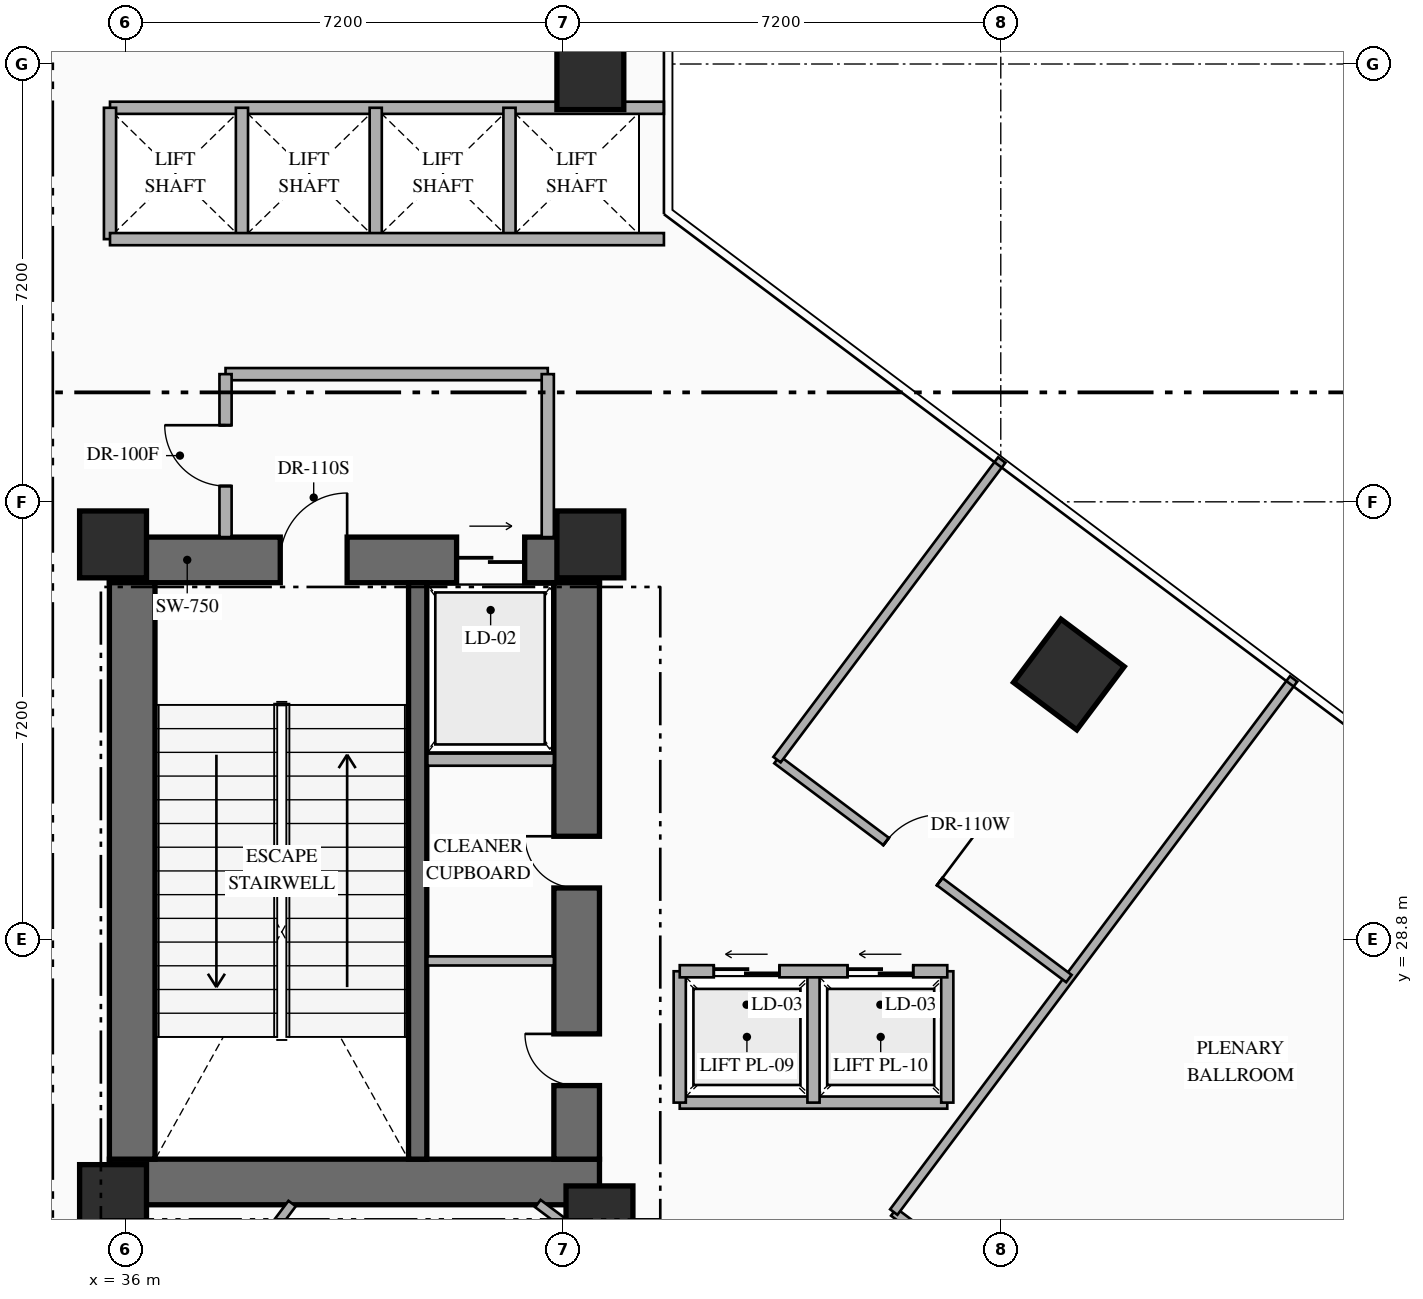
"""IFC4 building model, lengths in metres.
Left out: names, types, materials, properties, quantities, classifications, styles, units other than length and angle.
Written with IfcOpenShell. Run it as: python <this file> out.ifc"""

import sys

from ifc_helpers import new_model, si_unit, direction, frame, frame_2d, origin, origin_2d, place, context, subcontext, project, spatial, rectangle, extrude, element, fill, save


model = new_model("IFC4")
c1 = context("Model", 3, precision=1e-05, world=origin(), true_north=direction((0.0, 1.0)))
c2 = subcontext(c1, "Body", "Model", "MODEL_VIEW")
j1 = project(units=[si_unit("LENGTHUNIT", "METRE"), si_unit("PLANEANGLEUNIT", "RADIAN")], contexts=[c1])
p1 = place(None, origin())
s1 = spatial("IfcSite", under=j1, at=p1, CompositionType="ELEMENT")
p2 = place(p1, origin())
s2 = spatial("IfcBuilding", under=s1, at=p2, CompositionType="ELEMENT")
p3 = place(p2, frame((0.0, 0.0, 21.6)))
s3 = spatial("IfcBuildingStorey", under=s2, at=p3, CompositionType="ELEMENT", Elevation=21.6)
p4 = place(p3, frame((35.74, 24.815, 0.0), z_axis=(0.0, 0.0, 1.0), x_axis=(1.0, 0.0, 0.0)))
e1 = element("IfcWall", 1, at=p4, inside=s3, PredefinedType="SHEAR", context=c2, shape_type="SweptSolid", body=[
    extrude(rectangle(XDim=8.06, YDim=0.75, at=frame_2d((4.03, 0.0))), origin(), (0.0, 0.0, 1.0), 5.4),
])
p5 = place(p3, frame((35.74, 35.045, 0.0), z_axis=(0.0, 0.0, 1.0), x_axis=(1.0, 0.0, 0.0)))
e2 = element("IfcWall", 2, at=p5, inside=s3, PredefinedType="SHEAR", context=c2, shape_type="SweptSolid", body=[
    extrude(rectangle(XDim=8.06, YDim=0.75, at=frame_2d((4.03, 0.0))), origin(), (0.0, 0.0, 1.0), 5.4),
])
p6 = place(p5, frame((2.81, 0.0, 0.0)))
e3 = element("IfcOpeningElement", 3, at=p6, cuts=e2, PredefinedType="OPENING", context=c2, shape_type="SweptSolid", body=[
    extrude(rectangle(XDim=1.1, YDim=2.2, at=frame_2d((0.55, 1.1))), frame((0.0, 0.385, 0.0), z_axis=(0.0, -1.0, 0.0), x_axis=(1.0, 0.0, 0.0)), (0.0, 0.0, 1.0), 0.77),
])
p7 = place(p5, frame((5.71, 0.0, 0.0)))
e4 = element("IfcOpeningElement", 4, at=p7, cuts=e2, PredefinedType="OPENING", context=c2, shape_type="SweptSolid", body=[
    extrude(rectangle(XDim=1.12, YDim=2.15, at=frame_2d((0.56, 1.075))), frame((0.0, 0.385, 0.0), z_axis=(0.0, -1.0, 0.0), x_axis=(1.0, 0.0, 0.0)), (0.0, 0.0, 1.0), 0.77),
])
p8 = place(p3, frame((36.115, 25.19, 0.0), z_axis=(0.0, 0.0, 1.0), x_axis=(0.0, 1.0, 0.0)))
e5 = element("IfcWall", 5, at=p8, inside=s3, PredefinedType="SHEAR", context=c2, shape_type="SweptSolid", body=[
    extrude(rectangle(XDim=9.48, YDim=0.75, at=frame_2d((4.74, 0.0))), origin(), (0.0, 0.0, 1.0), 5.4),
])
p9 = place(p3, frame((43.425, 25.19, 0.0), z_axis=(0.0, 0.0, 1.0), x_axis=(0.0, 1.0, 0.0)))
e6 = element("IfcWall", 6, at=p9, inside=s3, PredefinedType="SHEAR", context=c2, shape_type="SweptSolid", body=[
    extrude(rectangle(XDim=9.48, YDim=0.75, at=frame_2d((4.74, 0.0))), origin(), (0.0, 0.0, 1.0), 5.4),
])
p10 = place(p9, frame((1.21, 0.0, 0.0)))
e7 = element("IfcOpeningElement", 7, at=p10, cuts=e6, PredefinedType="OPENING", context=c2, shape_type="SweptSolid", body=[
    extrude(rectangle(XDim=0.85, YDim=2.08, at=frame_2d((0.425, 1.04))), frame((0.0, 0.385, 0.0), z_axis=(0.0, -1.0, 0.0), x_axis=(1.0, 0.0, 0.0)), (0.0, 0.0, 1.0), 0.77),
])
p11 = place(p9, frame((4.46, 0.0, 0.0)))
e8 = element("IfcOpeningElement", 8, at=p11, cuts=e6, PredefinedType="OPENING", context=c2, shape_type="SweptSolid", body=[
    extrude(rectangle(XDim=0.85, YDim=2.08, at=frame_2d((0.425, 1.04))), frame((0.0, 0.385, 0.0), z_axis=(0.0, -1.0, 0.0), x_axis=(1.0, 0.0, 0.0)), (0.0, 0.0, 1.0), 0.77),
])
p12 = place(p3, frame((40.81, 25.19, 0.0), z_axis=(0.0, 0.0, 1.0), x_axis=(0.0, 1.0, 0.0)))
e9 = element("IfcWall", 9, at=p12, inside=s3, PredefinedType="SHEAR", context=c2, shape_type="SweptSolid", body=[
    extrude(rectangle(XDim=9.48, YDim=0.3, at=frame_2d((4.74, 0.0))), origin(), (0.0, 0.0, 1.0), 5.4),
])
for number, where, z_axis, x_axis in (
    (10, (35.8, 24.55, 0.0), (0.0, 0.0, 1.0), (1.0, 0.0, 0.0)),
    (11, (43.8, 24.2, 0.0), (0.0, 0.0, 1.0), (1.0, 0.0, 0.0)),
    (12, (35.8, 35.3, 0.0), (0.0, 0.0, 1.0), (1.0, 0.0, 0.0)),
    (13, (43.65, 35.3, 0.0), (0.0, 0.0, 1.0), (1.0, 0.0, 0.0)),
    (14, (43.65, 43.0, 0.0), (0.0, 0.0, 1.0), (1.0, 0.0, 0.0)),
):
    element("IfcColumn", number, at=place(p3, frame(where, z_axis=z_axis, x_axis=x_axis)), inside=s3, PredefinedType="COLUMN", context=c2, shape_type="SweptSolid", body=[
        extrude(rectangle(XDim=1.1, YDim=1.1, at=origin_2d()), origin(), (0.0, 0.0, 1.0), 5.4),
    ])
p13 = place(p3, frame((51.52, 33.16, 0.0), z_axis=(0.0, 0.0, 1.0), x_axis=(0.799999996291, -0.600000004945, 0.0)))
e15 = element("IfcColumn", 15, at=p13, inside=s3, PredefinedType="COLUMN", context=c2, shape_type="SweptSolid", body=[
    extrude(rectangle(XDim=1.3, YDim=1.3, at=origin_2d()), origin(), (0.0, 0.0, 1.0), 5.4),
])
p14 = place(p3, frame((40.97, 31.76, 0.0), z_axis=(0.0, 0.0, 1.0), x_axis=(1.0, 0.0, 0.0)))
e16 = element("IfcWall", 16, at=p14, inside=s3, PredefinedType="STANDARD", context=c2, shape_type="SweptSolid", body=[
    extrude(rectangle(XDim=2.08, YDim=0.2, at=frame_2d((1.04, 0.0))), origin(), (0.0, 0.0, 1.0), 5.1),
])
p15 = place(p3, frame((40.97, 28.45, 0.0), z_axis=(0.0, 0.0, 1.0), x_axis=(1.0, 0.0, 0.0)))
e17 = element("IfcWall", 17, at=p15, inside=s3, PredefinedType="PARTITIONING", context=c2, shape_type="SweptSolid", body=[
    extrude(rectangle(XDim=2.08, YDim=0.15, at=frame_2d((1.04, 0.0))), origin(), (0.0, 0.0, 1.0), 5.1),
])
p16 = place(p3, frame((37.65, 38.1, 0.0), z_axis=(0.0, 0.0, 1.0), x_axis=(1.0, 0.0, 0.0)))
e18 = element("IfcWall", 18, at=p16, inside=s3, PredefinedType="STANDARD", context=c2, shape_type="SweptSolid", body=[
    extrude(rectangle(XDim=5.3, YDim=0.2, at=frame_2d((2.65, 0.0))), origin(), (0.0, 0.0, 1.0), 5.1),
])
p17 = place(p3, frame((42.95, 35.42, 0.0), z_axis=(0.0, 0.0, 1.0), x_axis=(0.0, 1.0, 0.0)))
e19 = element("IfcWall", 19, at=p17, inside=s3, PredefinedType="STANDARD", context=c2, shape_type="SweptSolid", body=[
    extrude(rectangle(XDim=2.68, YDim=0.2, at=frame_2d((1.34, 0.0))), origin(), (0.0, 0.0, 1.0), 5.1),
])
p18 = place(p3, frame((37.65, 35.42, 0.0), z_axis=(0.0, 0.0, 1.0), x_axis=(0.0, 1.0, 0.0)))
e20 = element("IfcWall", 20, at=p18, inside=s3, PredefinedType="STANDARD", context=c2, shape_type="SweptSolid", body=[
    extrude(rectangle(XDim=2.68, YDim=0.2, at=frame_2d((1.34, 0.0))), origin(), (0.0, 0.0, 1.0), 5.1),
])
p19 = place(p18, frame((0.84, 0.0, 0.0)))
e21 = element("IfcOpeningElement", 21, at=p19, cuts=e20, PredefinedType="OPENING", context=c2, shape_type="SweptSolid", body=[
    extrude(rectangle(XDim=1.0, YDim=2.2, at=frame_2d((0.5, 1.1))), frame((0.0, 0.11, 0.0), z_axis=(0.0, -1.0, 0.0), x_axis=(1.0, 0.0, 0.0)), (0.0, 0.0, 1.0), 0.22),
])
p20 = place(p3, frame((35.75, 42.48, 0.0), z_axis=(0.0, 0.0, 1.0), x_axis=(1.0, 0.0, 0.0)))
e22 = element("IfcWall", 22, at=p20, inside=s3, PredefinedType="STANDARD", context=c2, shape_type="SweptSolid", body=[
    extrude(rectangle(XDim=9.11, YDim=0.2, at=frame_2d((4.555, 0.0))), origin(), (0.0, 0.0, 1.0), 5.1),
])
for number, where, z_axis, x_axis in (
    (23, (35.75, 40.32, 0.0), (0.0, 0.0, 1.0), (0.0, 1.0, 0.0)),
    (24, (37.92, 40.32, 0.0), (0.0, 0.0, 1.0), (0.0, 1.0, 0.0)),
    (25, (40.12, 40.32, 0.0), (0.0, 0.0, 1.0), (0.0, 1.0, 0.0)),
    (26, (42.32, 40.32, 0.0), (0.0, 0.0, 1.0), (0.0, 1.0, 0.0)),
):
    element("IfcWall", number, at=place(p3, frame(where, z_axis=z_axis, x_axis=x_axis)), inside=s3, PredefinedType="STANDARD", context=c2, shape_type="SweptSolid", body=[
        extrude(rectangle(XDim=2.16, YDim=0.2, at=frame_2d((1.08, 0.0))), origin(), (0.0, 0.0, 1.0), 5.1),
    ])
p21 = place(p3, frame((35.75, 40.32, 0.0), z_axis=(0.0, 0.0, 1.0), x_axis=(1.0, 0.0, 0.0)))
e27 = element("IfcWall", 27, at=p21, inside=s3, PredefinedType="STANDARD", context=c2, shape_type="SweptSolid", body=[
    extrude(rectangle(XDim=9.11, YDim=0.2, at=frame_2d((4.555, 0.0))), origin(), (0.0, 0.0, 1.0), 5.1),
])
p22 = place(p3, frame((45.12, 26.12, 0.0), z_axis=(0.0, 0.0, 1.0), x_axis=(1.0, 0.0, 0.0)))
e28 = element("IfcWall", 28, at=p22, inside=s3, PredefinedType="STANDARD", context=c2, shape_type="SweptSolid", body=[
    extrude(rectangle(XDim=4.4, YDim=0.2, at=frame_2d((2.2, 0.0))), origin(), (0.0, 0.0, 1.0), 5.1),
])
for number, where, z_axis, x_axis in (
    (29, (45.12, 26.12, 0.0), (0.0, 0.0, 1.0), (0.0, 1.0, 0.0)),
    (30, (49.52, 26.12, 0.0), (0.0, 0.0, 1.0), (0.0, 1.0, 0.0)),
    (31, (47.32, 26.12, 0.0), (0.0, 0.0, 1.0), (0.0, 1.0, 0.0)),
):
    element("IfcWall", number, at=place(p3, frame(where, z_axis=z_axis, x_axis=x_axis)), inside=s3, PredefinedType="STANDARD", context=c2, shape_type="SweptSolid", body=[
        extrude(rectangle(XDim=2.16, YDim=0.2, at=frame_2d((1.08, 0.0))), origin(), (0.0, 0.0, 1.0), 5.1),
    ])
p23 = place(p3, frame((45.12, 28.28, 0.0), z_axis=(0.0, 0.0, 1.0), x_axis=(1.0, 0.0, 0.0)))
e32 = element("IfcWall", 32, at=p23, inside=s3, PredefinedType="STANDARD", context=c2, shape_type="SweptSolid", body=[
    extrude(rectangle(XDim=4.4, YDim=0.2, at=frame_2d((2.2, 0.0))), origin(), (0.0, 0.0, 1.0), 5.1),
])
p24 = place(p23, frame((0.56, 0.0, 0.0)))
e33 = element("IfcOpeningElement", 33, at=p24, cuts=e32, PredefinedType="OPENING", context=c2, shape_type="SweptSolid", body=[
    extrude(rectangle(XDim=1.08, YDim=2.15, at=frame_2d((0.54, 1.075))), frame((0.0, 0.11, 0.0), z_axis=(0.0, -1.0, 0.0), x_axis=(1.0, 0.0, 0.0)), (0.0, 0.0, 1.0), 0.22),
])
p25 = place(p23, frame((2.76, 0.0, 0.0)))
e34 = element("IfcOpeningElement", 34, at=p25, cuts=e32, PredefinedType="OPENING", context=c2, shape_type="SweptSolid", body=[
    extrude(rectangle(XDim=1.08, YDim=2.15, at=frame_2d((0.54, 1.075))), frame((0.0, 0.11, 0.0), z_axis=(0.0, -1.0, 0.0), x_axis=(1.0, 0.0, 0.0)), (0.0, 0.0, 1.0), 0.22),
])
p26 = place(p3, frame((48.64, 24.32, 0.0), z_axis=(0.0, 0.0, 1.0), x_axis=(0.80000474051, -0.599993679268, 0.0)))
e35 = element("IfcWall", 35, at=p26, inside=s3, PredefinedType="PARTITIONING", context=c2, shape_type="SweptSolid", body=[
    extrude(rectangle(XDim=6.18, YDim=0.15, at=frame_2d((3.09, 0.0))), origin(), (0.0, 0.0, 1.0), 5.1),
])
p27 = place(p26, frame((2.54, 0.0, 0.0)))
e36 = element("IfcOpeningElement", 36, at=p27, cuts=e35, PredefinedType="OPENING", context=c2, shape_type="SweptSolid", body=[
    extrude(rectangle(XDim=1.1, YDim=2.16, at=frame_2d((0.55, 1.08))), frame((0.0, 0.085, 0.0), z_axis=(0.0, -1.0, 0.0), x_axis=(1.0, 0.0, 0.0)), (0.0, 0.0, 1.0), 0.17),
])
p28 = place(p3, frame((48.64, 24.32, 0.0), z_axis=(0.0, 0.0, 1.0), x_axis=(0.600017820398, 0.799986634391, 0.0)))
e37 = element("IfcWall", 37, at=p28, inside=s3, PredefinedType="PARTITIONING", context=c2, shape_type="SweptSolid", body=[
    extrude(rectangle(XDim=10.96, YDim=0.15, at=frame_2d((5.48, 0.0))), origin(), (0.0, 0.0, 1.0), 5.1),
])
p29 = place(p3, frame((53.584, 20.612, 0.0), z_axis=(0.0, 0.0, 1.0), x_axis=(0.600003564151, 0.799997326874, 0.0)))
e38 = element("IfcWall", 38, at=p29, inside=s3, PredefinedType="PARTITIONING", context=c2, shape_type="SweptSolid", body=[
    extrude(rectangle(XDim=10.96, YDim=0.15, at=frame_2d((5.48, 0.0))), origin(), (0.0, 0.0, 1.0), 5.1),
])
p30 = place(p3, frame((46.72, 31.76, 0.0), z_axis=(0.0, 0.0, 1.0), x_axis=(0.79999511724, -0.600006510291, 0.0)))
e39 = element("IfcWall", 39, at=p30, inside=s3, PredefinedType="PARTITIONING", context=c2, shape_type="SweptSolid", body=[
    extrude(rectangle(XDim=6.0, YDim=0.15, at=frame_2d((3.0, 0.0))), origin(), (0.0, 0.0, 1.0), 5.1),
])
p31 = place(p30, frame((2.243, 0.0, 0.0)))
e40 = element("IfcOpeningElement", 40, at=p31, cuts=e39, PredefinedType="OPENING", context=c2, shape_type="SweptSolid", body=[
    extrude(rectangle(XDim=1.1, YDim=2.16, at=frame_2d((0.55, 1.08))), frame((0.0, 0.085, 0.0), z_axis=(0.0, -1.0, 0.0), x_axis=(1.0, 0.0, 0.0)), (0.0, 0.0, 1.0), 0.17),
])
p32 = place(p3, frame((46.72, 31.76, 0.0), z_axis=(0.0, 0.0, 1.0), x_axis=(0.600006341286, 0.799995243996, 0.0)))
e41 = element("IfcWall", 41, at=p32, inside=s3, PredefinedType="PARTITIONING", context=c2, shape_type="SweptSolid", body=[
    extrude(rectangle(XDim=6.16, YDim=0.15, at=frame_2d((3.08, 0.0))), origin(), (0.0, 0.0, 1.0), 5.1),
])
p33 = place(p3, frame((42.787, 24.46, 0.0), z_axis=(0.0, 0.0, 1.0), x_axis=(0.799971872363, -0.600037501685, 0.0)))
e42 = element("IfcWall", 42, at=p33, inside=s3, PredefinedType="PARTITIONING", context=c2, shape_type="SweptSolid", body=[
    extrude(rectangle(XDim=4.167, YDim=0.15, at=frame_2d((2.083, 0.0))), origin(), (0.0, 0.0, 1.0), 3.295),
])
p34 = place(p33, frame((2.468, 0.0, 0.0)))
e43 = element("IfcOpeningElement", 43, at=p34, cuts=e42, PredefinedType="OPENING", context=c2, shape_type="SweptSolid", body=[
    extrude(rectangle(XDim=0.95, YDim=2.15, at=frame_2d((0.475, 1.075))), frame((0.0, 0.085, 0.0), z_axis=(0.0, -1.0, 0.0), x_axis=(1.0, 0.0, 0.0)), (0.0, 0.0, 1.0), 0.17),
])
p35 = place(p3, frame((33.384, 17.312, 0.0), z_axis=(0.0, 0.0, 1.0), x_axis=(0.600008743659, 0.799993442181, 0.0)))
e44 = element("IfcWall", 44, at=p35, inside=s3, PredefinedType="PARTITIONING", context=c2, shape_type="SweptSolid", body=[
    extrude(rectangle(XDim=8.935, YDim=0.15, at=frame_2d((4.468, 0.0))), origin(), (0.0, 0.0, 1.0), 5.1),
])
p36 = place(p6, origin())
e45 = element("IfcDoor", 45, at=p36, inside=s3, OperationType="SINGLE_SWING_RIGHT", PredefinedType="DOOR", context=c2, shape_type="SweptSolid", body=[
    extrude(rectangle(XDim=1.1, YDim=2.2, at=frame_2d((0.55, 1.1))), frame((0.0, 0.025, 0.0), z_axis=(0.0, -1.0, 0.0), x_axis=(1.0, 0.0, 0.0)), (0.0, 0.0, 1.0), 0.05),
])
fill(e3, e45)
p37 = place(p7, origin())
e46 = element("IfcDoor", 46, at=p37, inside=s3, OperationType="SLIDING_TO_RIGHT", PredefinedType="USERDEFINED", context=c2, shape_type="SweptSolid", body=[
    extrude(rectangle(XDim=1.12, YDim=2.15, at=frame_2d((0.56, 1.075))), frame((0.0, 0.025, 0.0), z_axis=(0.0, -1.0, 0.0), x_axis=(1.0, 0.0, 0.0)), (0.0, 0.0, 1.0), 0.05),
])
fill(e4, e46)
p38 = place(p10, origin())
e47 = element("IfcDoor", 47, at=p38, inside=s3, OperationType="SINGLE_SWING_RIGHT", PredefinedType="DOOR", context=c2, shape_type="SweptSolid", body=[
    extrude(rectangle(XDim=0.85, YDim=2.08, at=frame_2d((0.425, 1.04))), frame((0.0, 0.025, 0.0), z_axis=(0.0, -1.0, 0.0), x_axis=(1.0, 0.0, 0.0)), (0.0, 0.0, 1.0), 0.05),
])
fill(e7, e47)
p39 = place(p11, origin())
e48 = element("IfcDoor", 48, at=p39, inside=s3, OperationType="SINGLE_SWING_RIGHT", PredefinedType="DOOR", context=c2, shape_type="SweptSolid", body=[
    extrude(rectangle(XDim=0.85, YDim=2.08, at=frame_2d((0.425, 1.04))), frame((0.0, 0.025, 0.0), z_axis=(0.0, -1.0, 0.0), x_axis=(1.0, 0.0, 0.0)), (0.0, 0.0, 1.0), 0.05),
])
fill(e8, e48)
p40 = place(p19, origin())
e49 = element("IfcDoor", 49, at=p40, inside=s3, OperationType="SINGLE_SWING_RIGHT", PredefinedType="DOOR", context=c2, shape_type="SweptSolid", body=[
    extrude(rectangle(XDim=1.0, YDim=2.2, at=frame_2d((0.5, 1.1))), frame((0.0, 0.025, 0.0), z_axis=(0.0, -1.0, 0.0), x_axis=(1.0, 0.0, 0.0)), (0.0, 0.0, 1.0), 0.05),
])
fill(e21, e49)
p41 = place(p24, origin())
e50 = element("IfcDoor", 50, at=p41, inside=s3, OperationType="SLIDING_TO_LEFT", PredefinedType="USERDEFINED", context=c2, shape_type="SweptSolid", body=[
    extrude(rectangle(XDim=1.08, YDim=2.15, at=frame_2d((0.54, 1.075))), frame((0.0, 0.025, 0.0), z_axis=(0.0, -1.0, 0.0), x_axis=(1.0, 0.0, 0.0)), (0.0, 0.0, 1.0), 0.05),
])
fill(e33, e50)
p42 = place(p25, origin())
e51 = element("IfcDoor", 51, at=p42, inside=s3, OperationType="SLIDING_TO_LEFT", PredefinedType="USERDEFINED", context=c2, shape_type="SweptSolid", body=[
    extrude(rectangle(XDim=1.08, YDim=2.15, at=frame_2d((0.54, 1.075))), frame((0.0, 0.025, 0.0), z_axis=(0.0, -1.0, 0.0), x_axis=(1.0, 0.0, 0.0)), (0.0, 0.0, 1.0), 0.05),
])
fill(e34, e51)
p43 = place(p31, origin())
e52 = element("IfcDoor", 52, at=p43, inside=s3, OperationType="SINGLE_SWING_RIGHT", PredefinedType="DOOR", context=c2, shape_type="SweptSolid", body=[
    extrude(rectangle(XDim=1.1, YDim=2.16, at=frame_2d((0.55, 1.08))), frame((0.0, 0.025, 0.0), z_axis=(0.0, -1.0, 0.0), x_axis=(1.0, 0.0, 0.0)), (0.0, 0.0, 1.0), 0.05),
])
fill(e40, e52)
save(model, sys.argv[1])
